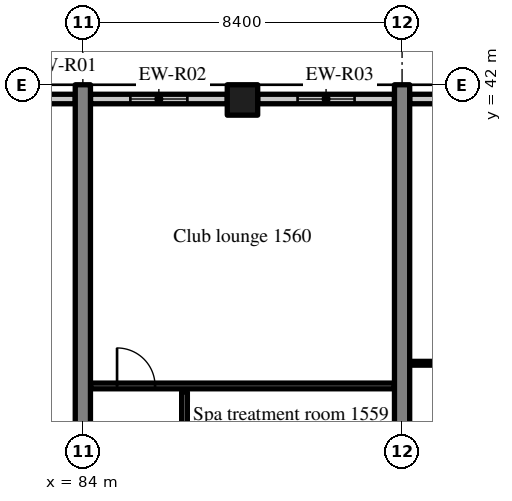
"""IFC4 building model, lengths in metres.
Left out: names, types, materials, properties, quantities, classifications, styles, units other than length and angle.
Written with IfcOpenShell. Run it as: python <this file> out.ifc"""

import sys

from ifc_helpers import new_model, si_unit, direction, frame, frame_2d, origin, origin_2d, place, context, subcontext, project, spatial, rectangle, extrude, source, transform, mapped, element, fill, save


model = new_model("IFC4")
c1 = context("Model", 3, precision=1e-05, world=origin(), true_north=direction((0.0, 1.0)))
c2 = subcontext(c1, "Body", "Model", "MODEL_VIEW")
j1 = project(units=[si_unit("LENGTHUNIT", "METRE"), si_unit("PLANEANGLEUNIT", "RADIAN")], contexts=[c1])
p1 = place(None, origin())
s1 = spatial("IfcSite", under=j1, at=p1, CompositionType="ELEMENT")
p2 = place(p1, origin())
s2 = spatial("IfcBuilding", under=s1, at=p2, CompositionType="ELEMENT")
p3 = place(p2, frame((0.0, 0.0, 65.8)))
s3 = spatial("IfcBuildingStorey", under=s2, at=p3, CompositionType="ELEMENT", Elevation=65.8)
m1 = source(origin(), c2, "Body", "SweptSolid", [
    extrude(rectangle(XDim=20.0, YDim=0.4, at=frame_2d((10.0, 0.0))), origin(), (0.0, 0.0, 1.0), 3.52),
])
for number, where, z_axis, x_axis in (
    (1, (84.0, 22.0, 0.0), (0.0, 0.0, 1.0), (0.0, 1.0, 0.0)),
    (2, (92.4, 22.0, 0.0), (0.0, 0.0, 1.0), (0.0, 1.0, 0.0)),
):
    element("IfcWall", number, at=place(p3, frame(where, z_axis=z_axis, x_axis=x_axis)), inside=s3, PredefinedType="SHEAR", context=c2, shape_type="MappedRepresentation", body=[
        mapped(m1, transform((0.0, 0.0, 0.0), scale=1.0)),
    ])
m2 = source(origin(), c2, "Body", "SweptSolid", [
    extrude(rectangle(XDim=0.8, YDim=0.8, at=origin_2d()), origin(), (0.0, 0.0, 1.0), 3.52),
])
p4 = place(p3, frame((88.2, 41.6, 0.0), z_axis=(0.0, 0.0, 1.0), x_axis=(1.0, 0.0, 0.0)))
e3 = element("IfcColumn", 3, at=p4, inside=s3, PredefinedType="COLUMN", context=c2, shape_type="MappedRepresentation", body=[
    mapped(m2, transform((0.0, 0.0, 0.0), scale=1.0)),
])
m3 = source(origin(), c2, "Body", "SweptSolid", [
    extrude(rectangle(XDim=1.658, YDim=0.25, at=frame_2d((0.829, 0.0))), origin(), (0.0, 0.0, 1.0), 2.82),
])
p5 = place(p3, frame((83.8, 41.625, 0.0), z_axis=(0.0, 0.0, 1.0), x_axis=(-1.0, 0.0, 0.0)))
e4 = element("IfcWall", 4, at=p5, inside=s3, PredefinedType="SOLIDWALL", context=c2, shape_type="MappedRepresentation", body=[
    mapped(m3, transform((0.0, 0.0, 0.0), scale=1.0)),
])
m4 = source(origin(), c2, "Body", "SweptSolid", [
    extrude(rectangle(XDim=3.6, YDim=0.25, at=frame_2d((1.8, 0.0))), origin(), (0.0, 0.0, 1.0), 2.82),
])
p6 = place(p3, frame((87.8, 41.625, 0.0), z_axis=(0.0, 0.0, 1.0), x_axis=(-1.0, 0.0, 0.0)))
e5 = element("IfcWall", 5, at=p6, inside=s3, PredefinedType="SOLIDWALL", context=c2, shape_type="MappedRepresentation", body=[
    mapped(m4, transform((0.0, 0.0, 0.0), scale=1.0)),
])
m5 = source(origin(), c2, "Body", "SweptSolid", [
    extrude(rectangle(XDim=1.5, YDim=1.5, at=frame_2d((0.75, 0.75))), frame((0.0, 0.135, 0.0), z_axis=(0.0, -1.0, 0.0), x_axis=(1.0, 0.0, 0.0)), (0.0, 0.0, 1.0), 0.27),
])
p7 = place(p6, frame((1.05, 0.0, 0.9)))
e6 = element("IfcOpeningElement", 6, at=p7, cuts=e5, PredefinedType="OPENING", context=c2, shape_type="MappedRepresentation", body=[
    mapped(m5, transform((0.0, 0.0, 0.0), scale=1.0)),
])
m6 = source(origin(), c2, "Body", "SweptSolid", [
    extrude(rectangle(XDim=3.6, YDim=0.25, at=frame_2d((1.8, 0.0))), origin(), (0.0, 0.0, 1.0), 2.82),
])
p8 = place(p3, frame((92.2, 41.625, 0.0), z_axis=(0.0, 0.0, 1.0), x_axis=(-1.0, 0.0, 0.0)))
e7 = element("IfcWall", 7, at=p8, inside=s3, PredefinedType="SOLIDWALL", context=c2, shape_type="MappedRepresentation", body=[
    mapped(m6, transform((0.0, 0.0, 0.0), scale=1.0)),
])
p9 = place(p8, frame((1.05, 0.0, 0.9)))
e8 = element("IfcOpeningElement", 8, at=p9, cuts=e7, PredefinedType="OPENING", context=c2, shape_type="MappedRepresentation", body=[
    mapped(m5, transform((0.0, 0.0, 0.0), scale=1.0)),
])
m7 = source(origin(), c2, "Body", "SweptSolid", [
    extrude(rectangle(XDim=4.045, YDim=0.25, at=frame_2d((2.022, 0.0))), origin(), (0.0, 0.0, 1.0), 2.82),
])
p10 = place(p3, frame((96.645, 41.625, 0.0), z_axis=(0.0, 0.0, 1.0), x_axis=(-1.0, 0.0, 0.0)))
e9 = element("IfcWall", 9, at=p10, inside=s3, PredefinedType="SOLIDWALL", context=c2, shape_type="MappedRepresentation", body=[
    mapped(m7, transform((0.0, 0.0, 0.0), scale=1.0)),
])
p11 = place(p10, frame((1.272, 0.0, 0.9)))
e10 = element("IfcOpeningElement", 10, at=p11, cuts=e9, PredefinedType="OPENING", context=c2, shape_type="MappedRepresentation", body=[
    mapped(m5, transform((0.0, 0.0, 0.0), scale=1.0)),
])
m8 = source(origin(), c2, "Body", "SweptSolid", [
    extrude(rectangle(XDim=4.45, YDim=0.15, at=frame_2d((2.225, 0.0))), origin(), (0.0, 0.0, 1.0), 3.52),
])
p12 = place(p3, frame((86.675, 29.475, 0.0), z_axis=(0.0, 0.0, 1.0), x_axis=(0.0, 1.0, 0.0)))
e11 = element("IfcWall", 11, at=p12, inside=s3, PredefinedType="PARTITIONING", context=c2, shape_type="MappedRepresentation", body=[
    mapped(m8, transform((0.0, 0.0, 0.0), scale=1.0)),
])
m9 = source(origin(), c2, "Body", "SweptSolid", [
    extrude(rectangle(XDim=1.0, YDim=2.1, at=frame_2d((0.5, 1.05))), frame((0.0, 0.085, 0.0), z_axis=(0.0, -1.0, 0.0), x_axis=(1.0, 0.0, 0.0)), (0.0, 0.0, 1.0), 0.17),
])
p13 = place(p12, frame((1.725, 0.0, 0.0)))
e12 = element("IfcOpeningElement", 12, at=p13, cuts=e11, PredefinedType="OPENING", context=c2, shape_type="MappedRepresentation", body=[
    mapped(m9, transform((0.0, 0.0, 0.0), scale=1.0)),
])
m10 = source(origin(), c2, "Body", "SweptSolid", [
    extrude(rectangle(XDim=8.0, YDim=0.15, at=frame_2d((4.0, 0.0))), origin(), (0.0, 0.0, 1.0), 3.52),
])
p14 = place(p3, frame((84.2, 34.075, 0.0), z_axis=(0.0, 0.0, 1.0), x_axis=(1.0, 0.0, 0.0)))
e13 = element("IfcWall", 13, at=p14, inside=s3, PredefinedType="PARTITIONING", context=c2, shape_type="MappedRepresentation", body=[
    mapped(m10, transform((0.0, 0.0, 0.0), scale=1.0)),
])
p15 = place(p14, frame((0.7, 0.0, 0.0)))
e14 = element("IfcOpeningElement", 14, at=p15, cuts=e13, PredefinedType="OPENING", context=c2, shape_type="MappedRepresentation", body=[
    mapped(m9, transform((0.0, 0.0, 0.0), scale=1.0)),
])
m11 = source(origin(), c2, "Body", "SweptSolid", [
    extrude(rectangle(XDim=7.8, YDim=0.1, at=frame_2d((3.9, 0.0))), origin(), (0.0, 0.0, 1.0), 3.52),
])
p16 = place(p3, frame((92.6, 34.672, 0.0), z_axis=(0.0, 0.0, 1.0), x_axis=(1.0, 0.0, 0.0)))
e15 = element("IfcWall", 15, at=p16, inside=s3, PredefinedType="PARTITIONING", context=c2, shape_type="MappedRepresentation", body=[
    mapped(m11, transform((0.0, 0.0, 0.0), scale=1.0)),
])
m12 = source(origin(), c2, "Body", "SweptSolid", [
    extrude(rectangle(XDim=1.8, YDim=2.1, at=frame_2d((0.9, 1.05))), frame((0.0, 0.06, 0.0), z_axis=(0.0, -1.0, 0.0), x_axis=(1.0, 0.0, 0.0)), (0.0, 0.0, 1.0), 0.12),
])
p17 = place(p16, frame((3.0, 0.0, 0.0)))
e16 = element("IfcOpeningElement", 16, at=p17, cuts=e15, PredefinedType="OPENING", context=c2, shape_type="MappedRepresentation", body=[
    mapped(m12, transform((0.0, 0.0, 0.0), scale=1.0)),
])
m13 = source(origin(), c2, "Body", "SweptSolid", [
    extrude(rectangle(XDim=1.5, YDim=1.5, at=frame_2d((0.75, 0.75))), frame((0.0, 0.03, 0.0), z_axis=(0.0, -1.0, 0.0), x_axis=(1.0, 0.0, 0.0)), (0.0, 0.0, 1.0), 0.06),
])
p18 = place(p7, origin())
e17 = element("IfcWindow", 17, at=p18, inside=s3, PartitioningType="SINGLE_PANEL", PredefinedType="WINDOW", context=c2, shape_type="MappedRepresentation", body=[
    mapped(m13, transform((0.0, 0.0, 0.0), scale=1.0)),
])
fill(e6, e17)
p19 = place(p9, origin())
e18 = element("IfcWindow", 18, at=p19, inside=s3, PartitioningType="SINGLE_PANEL", PredefinedType="WINDOW", context=c2, shape_type="MappedRepresentation", body=[
    mapped(m13, transform((0.0, 0.0, 0.0), scale=1.0)),
])
fill(e8, e18)
m14 = source(origin(), c2, "Body", "SweptSolid", [
    extrude(rectangle(XDim=1.0, YDim=2.1, at=frame_2d((0.5, 1.05))), frame((0.0, 0.025, 0.0), z_axis=(0.0, -1.0, 0.0), x_axis=(1.0, 0.0, 0.0)), (0.0, 0.0, 1.0), 0.05),
])
p20 = place(p15, origin())
e19 = element("IfcDoor", 19, at=p20, inside=s3, OperationType="SINGLE_SWING_LEFT", PredefinedType="DOOR", context=c2, shape_type="MappedRepresentation", body=[
    mapped(m14, transform((0.0, 0.0, 0.0), scale=1.0)),
])
fill(e14, e19)
save(model, sys.argv[1])
